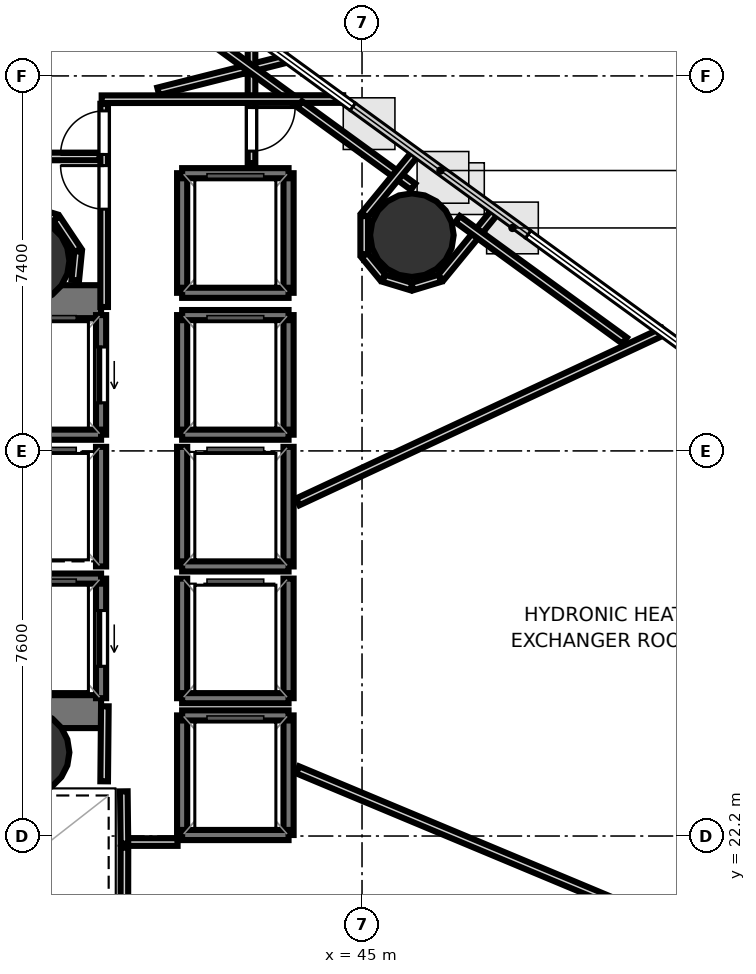
"""IFC4 building model, lengths in metres.
Left out: names, types, materials, properties, quantities, classifications, styles, units other than length and angle.
Written with IfcOpenShell. Run it as: python <this file> out.ifc"""

import sys

from ifc_helpers import new_model, si_unit, direction, frame, frame_2d, origin, origin_2d, place, context, subcontext, project, spatial, rectangle, hollow_circle, extrude, element, fill, save


model = new_model("IFC4")
c1 = context("Model", 3, precision=1e-05, world=origin(), true_north=direction((0.0, 1.0)))
c2 = subcontext(c1, "Body", "Model", "MODEL_VIEW")
j1 = project(units=[si_unit("LENGTHUNIT", "METRE"), si_unit("PLANEANGLEUNIT", "RADIAN")], contexts=[c1])
p1 = place(None, origin())
s1 = spatial("IfcSite", under=j1, at=p1, CompositionType="ELEMENT")
p2 = place(p1, origin())
s2 = spatial("IfcBuilding", under=s1, at=p2, CompositionType="ELEMENT")
p3 = place(p2, frame((0.0, 0.0, 93.2)))
s3 = spatial("IfcBuildingStorey", under=s2, at=p3, CompositionType="ELEMENT", Elevation=93.2)
p4 = place(p3, frame((29.13, 32.745, 0.0), z_axis=(0.0, 0.0, 1.0), x_axis=(1.0, 0.0, 0.0)))
e1 = element("IfcWall", 1, at=p4, inside=s3, PredefinedType="SHEAR", context=c2, shape_type="SweptSolid", body=[
    extrude(rectangle(XDim=10.72, YDim=0.65, at=frame_2d((5.36, 0.0))), origin(), (0.0, 0.0, 1.0), 4.42),
])
p5 = place(p4, frame((1.095, 0.0, 0.0)))
e2 = element("IfcOpeningElement", 2, at=p5, cuts=e1, PredefinedType="OPENING", context=c2, shape_type="SweptSolid", body=[
    extrude(rectangle(XDim=1.25, YDim=2.15, at=frame_2d((0.625, 1.075))), frame((0.0, 0.335, 0.0), z_axis=(0.0, -1.0, 0.0), x_axis=(1.0, 0.0, 0.0)), (0.0, 0.0, 1.0), 0.67),
])
p6 = place(p3, frame((29.13, 24.655, 0.0), z_axis=(0.0, 0.0, 1.0), x_axis=(1.0, 0.0, 0.0)))
e3 = element("IfcWall", 3, at=p6, inside=s3, PredefinedType="SHEAR", context=c2, shape_type="SweptSolid", body=[
    extrude(rectangle(XDim=10.72, YDim=0.65, at=frame_2d((5.36, 0.0))), origin(), (0.0, 0.0, 1.0), 4.42),
])
p7 = place(p6, frame((0.895, 0.0, 0.0)))
e4 = element("IfcOpeningElement", 4, at=p7, cuts=e3, PredefinedType="OPENING", context=c2, shape_type="SweptSolid", body=[
    extrude(rectangle(XDim=1.25, YDim=2.15, at=frame_2d((0.625, 1.075))), frame((0.0, 0.335, 0.0), z_axis=(0.0, -1.0, 0.0), x_axis=(1.0, 0.0, 0.0)), (0.0, 0.0, 1.0), 0.67),
])
for number, where, z_axis, x_axis in (
    (5, (38.4, 33.55, 0.0), (0.0, 0.0, 1.0), (1.0, 0.0, 0.0)),
    (6, (38.4, 23.85, 0.0), (0.0, 0.0, 1.0), (1.0, 0.0, 0.0)),
    (7, (45.984, 34.057, 0.0), (0.0, 0.0, 1.0), (1.0, 0.0, 0.0)),
):
    element("IfcColumn", number, at=place(p3, frame(where, z_axis=z_axis, x_axis=x_axis)), inside=s3, PredefinedType="COLUMN", context=c2, shape_type="SweptSolid", body=[
        extrude(hollow_circle(Radius=0.825, WallThickness=0.04, at=origin_2d()), origin(), (0.0, 0.0, 1.0), 4.6),
    ])
p8 = place(p3, frame((39.85, 30.12, 0.0), z_axis=(0.0, 0.0, 1.0), x_axis=(0.0, 1.0, 0.0)))
e8 = element("IfcWall", 8, at=p8, inside=s3, PredefinedType="SOLIDWALL", context=c2, shape_type="SweptSolid", body=[
    extrude(rectangle(XDim=2.36, YDim=0.2, at=frame_2d((1.18, 0.0))), origin(), (0.0, 0.0, 1.0), 4.42),
])
p9 = place(p8, frame((0.63, 0.0, 0.0)))
e9 = element("IfcOpeningElement", 9, at=p9, cuts=e8, PredefinedType="OPENING", context=c2, shape_type="SweptSolid", body=[
    extrude(rectangle(XDim=1.1, YDim=2.15, at=frame_2d((0.55, 1.075))), frame((0.0, 0.11, 0.0), z_axis=(0.0, -1.0, 0.0), x_axis=(1.0, 0.0, 0.0)), (0.0, 0.0, 1.0), 0.22),
])
p10 = place(p3, frame((37.75, 30.12, 0.0), z_axis=(0.0, 0.0, 1.0), x_axis=(1.0, 0.0, 0.0)))
e10 = element("IfcWall", 10, at=p10, inside=s3, PredefinedType="SOLIDWALL", context=c2, shape_type="SweptSolid", body=[
    extrude(rectangle(XDim=2.1, YDim=0.2, at=frame_2d((1.05, 0.0))), origin(), (0.0, 0.0, 1.0), 4.42),
])
p11 = place(p3, frame((39.85, 24.92, 0.0), z_axis=(0.0, 0.0, 1.0), x_axis=(0.0, 1.0, 0.0)))
e11 = element("IfcWall", 11, at=p11, inside=s3, PredefinedType="SOLIDWALL", context=c2, shape_type="SweptSolid", body=[
    extrude(rectangle(XDim=2.36, YDim=0.2, at=frame_2d((1.18, 0.0))), origin(), (0.0, 0.0, 1.0), 4.42),
])
p12 = place(p11, frame((0.63, 0.0, 0.0)))
e12 = element("IfcOpeningElement", 12, at=p12, cuts=e11, PredefinedType="OPENING", context=c2, shape_type="SweptSolid", body=[
    extrude(rectangle(XDim=1.1, YDim=2.15, at=frame_2d((0.55, 1.075))), frame((0.0, 0.11, 0.0), z_axis=(0.0, -1.0, 0.0), x_axis=(1.0, 0.0, 0.0)), (0.0, 0.0, 1.0), 0.22),
])
p13 = place(p3, frame((37.75, 27.28, 0.0), z_axis=(0.0, 0.0, 1.0), x_axis=(1.0, 0.0, 0.0)))
e13 = element("IfcWall", 13, at=p13, inside=s3, PredefinedType="SOLIDWALL", context=c2, shape_type="SweptSolid", body=[
    extrude(rectangle(XDim=2.1, YDim=0.2, at=frame_2d((1.05, 0.0))), origin(), (0.0, 0.0, 1.0), 4.42),
])
for number, where, z_axis, x_axis in (
    (14, (43.55, 30.12, 0.0), (0.0, 0.0, 1.0), (0.0, 1.0, 0.0)),
    (15, (41.45, 30.12, 0.0), (0.0, 0.0, 1.0), (0.0, 1.0, 0.0)),
):
    element("IfcWall", number, at=place(p3, frame(where, z_axis=z_axis, x_axis=x_axis)), inside=s3, PredefinedType="SOLIDWALL", context=c2, shape_type="SweptSolid", body=[
        extrude(rectangle(XDim=2.36, YDim=0.2, at=frame_2d((1.18, 0.0))), origin(), (0.0, 0.0, 1.0), 4.42),
    ])
for number, where, z_axis, x_axis in (
    (16, (41.45, 32.48, 0.0), (0.0, 0.0, 1.0), (1.0, 0.0, 0.0)),
    (17, (41.45, 30.12, 0.0), (0.0, 0.0, 1.0), (1.0, 0.0, 0.0)),
):
    element("IfcWall", number, at=place(p3, frame(where, z_axis=z_axis, x_axis=x_axis)), inside=s3, PredefinedType="SOLIDWALL", context=c2, shape_type="SweptSolid", body=[
        extrude(rectangle(XDim=2.1, YDim=0.2, at=frame_2d((1.05, 0.0))), origin(), (0.0, 0.0, 1.0), 4.42),
    ])
for number, where, z_axis, x_axis in (
    (18, (43.55, 27.52, 0.0), (0.0, 0.0, 1.0), (0.0, 1.0, 0.0)),
    (19, (41.45, 27.52, 0.0), (0.0, 0.0, 1.0), (0.0, 1.0, 0.0)),
):
    element("IfcWall", number, at=place(p3, frame(where, z_axis=z_axis, x_axis=x_axis)), inside=s3, PredefinedType="SOLIDWALL", context=c2, shape_type="SweptSolid", body=[
        extrude(rectangle(XDim=2.36, YDim=0.2, at=frame_2d((1.18, 0.0))), origin(), (0.0, 0.0, 1.0), 4.42),
    ])
p14 = place(p3, frame((41.45, 27.52, 0.0), z_axis=(0.0, 0.0, 1.0), x_axis=(1.0, 0.0, 0.0)))
e20 = element("IfcWall", 20, at=p14, inside=s3, PredefinedType="SOLIDWALL", context=c2, shape_type="SweptSolid", body=[
    extrude(rectangle(XDim=2.1, YDim=0.2, at=frame_2d((1.05, 0.0))), origin(), (0.0, 0.0, 1.0), 4.42),
])
for number, where, z_axis, x_axis in (
    (21, (43.55, 24.92, 0.0), (0.0, 0.0, 1.0), (0.0, 1.0, 0.0)),
    (22, (41.45, 24.92, 0.0), (0.0, 0.0, 1.0), (0.0, 1.0, 0.0)),
):
    element("IfcWall", number, at=place(p3, frame(where, z_axis=z_axis, x_axis=x_axis)), inside=s3, PredefinedType="SOLIDWALL", context=c2, shape_type="SweptSolid", body=[
        extrude(rectangle(XDim=2.36, YDim=0.2, at=frame_2d((1.18, 0.0))), origin(), (0.0, 0.0, 1.0), 4.42),
    ])
p15 = place(p3, frame((41.45, 24.92, 0.0), z_axis=(0.0, 0.0, 1.0), x_axis=(1.0, 0.0, 0.0)))
e23 = element("IfcWall", 23, at=p15, inside=s3, PredefinedType="SOLIDWALL", context=c2, shape_type="SweptSolid", body=[
    extrude(rectangle(XDim=2.1, YDim=0.2, at=frame_2d((1.05, 0.0))), origin(), (0.0, 0.0, 1.0), 4.42),
])
p16 = place(p3, frame((39.85, 27.52, 0.0), z_axis=(0.0, 0.0, 1.0), x_axis=(0.0, 1.0, 0.0)))
e24 = element("IfcWall", 24, at=p16, inside=s3, PredefinedType="SOLIDWALL", context=c2, shape_type="SweptSolid", body=[
    extrude(rectangle(XDim=2.36, YDim=0.2, at=frame_2d((1.18, 0.0))), origin(), (0.0, 0.0, 1.0), 4.42),
])
for number, where, z_axis, x_axis in (
    (25, (43.55, 22.22, 0.0), (0.0, 0.0, 1.0), (0.0, 1.0, 0.0)),
    (26, (41.45, 22.22, 0.0), (0.0, 0.0, 1.0), (0.0, 1.0, 0.0)),
):
    element("IfcWall", number, at=place(p3, frame(where, z_axis=z_axis, x_axis=x_axis)), inside=s3, PredefinedType="SOLIDWALL", context=c2, shape_type="SweptSolid", body=[
        extrude(rectangle(XDim=2.36, YDim=0.2, at=frame_2d((1.18, 0.0))), origin(), (0.0, 0.0, 1.0), 4.42),
    ])
for number, where, z_axis, x_axis in (
    (27, (41.45, 24.58, 0.0), (0.0, 0.0, 1.0), (1.0, 0.0, 0.0)),
    (28, (41.45, 22.22, 0.0), (0.0, 0.0, 1.0), (1.0, 0.0, 0.0)),
):
    element("IfcWall", number, at=place(p3, frame(where, z_axis=z_axis, x_axis=x_axis)), inside=s3, PredefinedType="SOLIDWALL", context=c2, shape_type="SweptSolid", body=[
        extrude(rectangle(XDim=2.1, YDim=0.2, at=frame_2d((1.05, 0.0))), origin(), (0.0, 0.0, 1.0), 4.42),
    ])
for number, where, z_axis, x_axis in (
    (29, (43.55, 32.92, 0.0), (0.0, 0.0, 1.0), (0.0, 1.0, 0.0)),
    (30, (41.45, 32.92, 0.0), (0.0, 0.0, 1.0), (0.0, 1.0, 0.0)),
):
    element("IfcWall", number, at=place(p3, frame(where, z_axis=z_axis, x_axis=x_axis)), inside=s3, PredefinedType="SOLIDWALL", context=c2, shape_type="SweptSolid", body=[
        extrude(rectangle(XDim=2.36, YDim=0.2, at=frame_2d((1.18, 0.0))), origin(), (0.0, 0.0, 1.0), 4.42),
    ])
for number, where, z_axis, x_axis in (
    (31, (41.45, 35.28, 0.0), (0.0, 0.0, 1.0), (1.0, 0.0, 0.0)),
    (32, (41.45, 32.92, 0.0), (0.0, 0.0, 1.0), (1.0, 0.0, 0.0)),
):
    element("IfcWall", number, at=place(p3, frame(where, z_axis=z_axis, x_axis=x_axis)), inside=s3, PredefinedType="SOLIDWALL", context=c2, shape_type="SweptSolid", body=[
        extrude(rectangle(XDim=2.1, YDim=0.2, at=frame_2d((1.05, 0.0))), origin(), (0.0, 0.0, 1.0), 4.42),
    ])
p17 = place(p3, frame((39.911, 32.64, 0.0), z_axis=(0.0, 0.0, 1.0), x_axis=(0.0, 1.0, 0.0)))
e33 = element("IfcWall", 33, at=p17, inside=s3, PredefinedType="PARTITIONING", context=c2, shape_type="SweptSolid", body=[
    extrude(rectangle(XDim=4.01, YDim=0.15, at=frame_2d((2.005, 0.0))), origin(), (0.0, 0.0, 1.0), 2.94),
])
p18 = place(p17, frame((3.01, 0.0, 0.0)))
e34 = element("IfcOpeningElement", 34, at=p18, cuts=e33, PredefinedType="OPENING", context=c2, shape_type="SweptSolid", body=[
    extrude(rectangle(XDim=0.86, YDim=2.05, at=frame_2d((0.43, 1.025))), frame((0.0, 0.085, 0.0), z_axis=(0.0, -1.0, 0.0), x_axis=(1.0, 0.0, 0.0)), (0.0, 0.0, 1.0), 0.17),
])
p19 = place(p17, frame((1.93, 0.0, 0.0)))
e35 = element("IfcOpeningElement", 35, at=p19, cuts=e33, PredefinedType="OPENING", context=c2, shape_type="SweptSolid", body=[
    extrude(rectangle(XDim=0.86, YDim=2.05, at=frame_2d((0.43, 1.025))), frame((0.0, 0.085, 0.0), z_axis=(0.0, -1.0, 0.0), x_axis=(1.0, 0.0, 0.0)), (0.0, 0.0, 1.0), 0.17),
])
p20 = place(p3, frame((40.978, 36.896, 0.0), z_axis=(0.0, 0.0, 1.0), x_axis=(0.969602772959, 0.244684414441, 0.0)))
e36 = element("IfcWall", 36, at=p20, inside=s3, PredefinedType="PARTITIONING", context=c2, shape_type="SweptSolid", body=[
    extrude(rectangle(XDim=2.619, YDim=0.15, at=frame_2d((1.31, 0.0))), origin(), (0.0, 0.0, 1.0), 2.94),
])
p21 = place(p3, frame((42.819, 38.065, 0.0), z_axis=(0.0, 0.0, 1.0), x_axis=(0.0, -1.0, 0.0)))
e37 = element("IfcWall", 37, at=p21, inside=s3, PredefinedType="PARTITIONING", context=c2, shape_type="SweptSolid", body=[
    extrude(rectangle(XDim=2.585, YDim=0.15, at=frame_2d((1.292, 0.0))), origin(), (0.0, 0.0, 1.0), 2.94),
])
p22 = place(p21, frame((1.489, 0.0, 0.0)))
e38 = element("IfcOpeningElement", 38, at=p22, cuts=e37, PredefinedType="OPENING", context=c2, shape_type="SweptSolid", body=[
    extrude(rectangle(XDim=0.86, YDim=2.05, at=frame_2d((0.43, 1.025))), frame((0.0, 0.085, 0.0), z_axis=(0.0, -1.0, 0.0), x_axis=(1.0, 0.0, 0.0)), (0.0, 0.0, 1.0), 0.17),
])
p23 = place(p3, frame((41.36, 22.081, 0.0), z_axis=(0.0, 0.0, 1.0), x_axis=(-1.0, 0.0, 0.0)))
e39 = element("IfcWall", 39, at=p23, inside=s3, PredefinedType="PARTITIONING", context=c2, shape_type="SweptSolid", body=[
    extrude(rectangle(XDim=1.08, YDim=0.15, at=frame_2d((0.54, 0.0))), origin(), (0.0, 0.0, 1.0), 2.94),
])
p24 = place(p3, frame((40.311, 22.05, 0.0), z_axis=(0.0, 0.0, 1.0), x_axis=(-0.011836292006, 0.999929948642, 0.0)))
e40 = element("IfcWall", 40, at=p24, inside=s3, PredefinedType="PARTITIONING", context=c2, shape_type="SweptSolid", body=[
    extrude(rectangle(XDim=1.031, YDim=0.15, at=frame_2d((0.516, 0.0))), origin(), (0.0, 0.0, 1.0), 2.94),
])
p25 = place(p3, frame((39.911, 23.28, 0.0), z_axis=(0.0, 0.0, 1.0), x_axis=(0.009397771291, 0.999955839972, 0.0)))
e41 = element("IfcWall", 41, at=p25, inside=s3, PredefinedType="PARTITIONING", context=c2, shape_type="SweptSolid", body=[
    extrude(rectangle(XDim=1.481, YDim=0.15, at=frame_2d((0.74, 0.0))), origin(), (0.0, 0.0, 1.0), 2.94),
])
p26 = place(p3, frame((40.149, 39.275, 0.0), z_axis=(0.0, 0.0, 1.0), x_axis=(0.808678485234, -0.588250888243, 0.0)))
e42 = element("IfcWall", 42, at=p26, inside=s3, PredefinedType="PARTITIONING", context=c2, shape_type="SweptSolid", body=[
    extrude(rectangle(XDim=4.399, YDim=0.15, at=frame_2d((2.2, 0.0))), origin(), (0.0, 0.0, 1.0), 2.94),
])
p27 = place(p3, frame((44.628, 36.744, 0.0), z_axis=(0.0, 0.0, 1.0), x_axis=(-0.999999742855, -0.000717139453, 0.0)))
e43 = element("IfcWall", 43, at=p27, inside=s3, PredefinedType="PARTITIONING", context=c2, shape_type="SweptSolid", body=[
    extrude(rectangle(XDim=4.766, YDim=0.15, at=frame_2d((2.383, 0.0))), origin(), (0.0, 0.0, 1.0), 2.94),
])
p28 = place(p3, frame((39.818, 35.611, 0.0), z_axis=(0.0, 0.0, 1.0), x_axis=(-1.0, 0.0, 0.0)))
e44 = element("IfcWall", 44, at=p28, inside=s3, PredefinedType="PARTITIONING", context=c2, shape_type="SweptSolid", body=[
    extrude(rectangle(XDim=7.398, YDim=0.15, at=frame_2d((3.699, 0.0))), origin(), (0.0, 0.0, 1.0), 2.94),
])
p29 = place(p3, frame((43.733, 28.795, 0.0), z_axis=(0.0, 0.0, 1.0), x_axis=(0.906319515089, 0.422593109941, 0.0)))
e45 = element("IfcWall", 45, at=p29, inside=s3, PredefinedType="PARTITIONING", context=c2, shape_type="SweptSolid", body=[
    extrude(rectangle(XDim=7.955, YDim=0.15, at=frame_2d((3.978, 0.0))), origin(), (0.0, 0.0, 1.0), 2.94),
])
p30 = place(p3, frame((56.702, 18.086, 0.0), z_axis=(0.0, 0.0, 1.0), x_axis=(-0.922688059658, 0.385547331161, 0.0)))
e46 = element("IfcWall", 46, at=p30, inside=s3, PredefinedType="PARTITIONING", context=c2, shape_type="SweptSolid", body=[
    extrude(rectangle(XDim=14.06, YDim=0.15, at=frame_2d((7.03, 0.0))), origin(), (0.0, 0.0, 1.0), 2.94),
])
p31 = place(p30, frame((6.505, 0.0, 0.0)))
e47 = element("IfcOpeningElement", 47, at=p31, cuts=e46, PredefinedType="OPENING", context=c2, shape_type="SweptSolid", body=[
    extrude(rectangle(XDim=1.05, YDim=2.15, at=frame_2d((0.525, 1.075))), frame((0.0, 0.085, 0.0), z_axis=(0.0, -1.0, 0.0), x_axis=(1.0, 0.0, 0.0)), (0.0, 0.0, 1.0), 0.17),
])
p32 = place(p3, frame((40.306, 17.945, 0.0), z_axis=(0.0, 0.0, 1.0), x_axis=(0.001334545369, 0.999999109494, 0.0)))
e48 = element("IfcWall", 48, at=p32, inside=s3, PredefinedType="PARTITIONING", context=c2, shape_type="SweptSolid", body=[
    extrude(rectangle(XDim=4.025, YDim=0.15, at=frame_2d((2.012, 0.0))), origin(), (0.0, 0.0, 1.0), 2.94),
])
p33 = place(p3, frame((43.771, 36.64, 0.0), z_axis=(0.0, 0.0, 1.0), x_axis=(0.80866355955, -0.588271406287, 0.0)))
e49 = element("IfcWall", 49, at=p33, inside=s3, PredefinedType="PARTITIONING", context=c2, shape_type="SweptSolid", body=[
    extrude(rectangle(XDim=2.766, YDim=0.15, at=frame_2d((1.383, 0.0))), origin(), (0.0, 0.0, 1.0), 2.94),
])
p34 = place(p3, frame((46.074, 35.702, 0.0), z_axis=(0.0, 0.0, 1.0), x_axis=(-0.634291123896, -0.773094282832, 0.0)))
e50 = element("IfcWall", 50, at=p34, inside=s3, PredefinedType="PARTITIONING", context=c2, shape_type="SweptSolid", body=[
    extrude(rectangle(XDim=1.615, YDim=0.15, at=frame_2d((0.807, 0.0))), origin(), (0.0, 0.0, 1.0), 2.94),
])
p35 = place(p3, frame((45.043, 34.434, 0.0), z_axis=(0.0, 0.0, 1.0), x_axis=(0.0, -1.0, 0.0)))
e51 = element("IfcWall", 51, at=p35, inside=s3, PredefinedType="PARTITIONING", context=c2, shape_type="SweptSolid", body=[
    extrude(rectangle(XDim=0.754, YDim=0.15, at=frame_2d((0.377, 0.0))), origin(), (0.0, 0.0, 1.0), 2.94),
])
for number, where, z_axis, x_axis in (
    (52, (45.05, 33.66, 0.0), (0.0, 0.0, 1.0), (0.634, -0.773, 0.0)),
    (53, (45.428, 33.208, 0.0), (0.0, 0.0, 1.0), (0.957, -0.29, 0.0)),
    (54, (45.993, 33.042, 0.0), (0.0, 0.0, 1.0), (0.957, 0.29, 0.0)),
):
    element("IfcWall", number, at=place(p3, frame(where, z_axis=z_axis, x_axis=x_axis)), inside=s3, PredefinedType="PARTITIONING", context=c2, shape_type="SweptSolid", body=[
        extrude(rectangle(XDim=0.572, YDim=0.15, at=frame_2d((0.286, 0.0))), origin(), (0.0, 0.0, 1.0), 2.94),
    ])
p36 = place(p3, frame((46.555, 33.218, 0.0), z_axis=(0.0, 0.0, 1.0), x_axis=(0.634344749857, 0.773050281889, 0.0)))
e55 = element("IfcWall", 55, at=p36, inside=s3, PredefinedType="PARTITIONING", context=c2, shape_type="SweptSolid", body=[
    extrude(rectangle(XDim=1.729, YDim=0.15, at=frame_2d((0.864, 0.0))), origin(), (0.0, 0.0, 1.0), 2.94),
])
p37 = place(p3, frame((46.886, 34.374, 0.0), z_axis=(0.0, 0.0, 1.0), x_axis=(0.808707605228, -0.58821085441, 0.0)))
e56 = element("IfcWall", 56, at=p37, inside=s3, PredefinedType="PARTITIONING", context=c2, shape_type="SweptSolid", body=[
    extrude(rectangle(XDim=4.078, YDim=0.15, at=frame_2d((2.039, 0.0))), origin(), (0.0, 0.0, 1.0), 2.94),
])
p38 = place(p3, frame((39.341, 33.17, 0.0), z_axis=(0.0, 0.0, 1.0), x_axis=(0.098193262045, 0.995167364461, 0.0)))
e57 = element("IfcWall", 57, at=p38, inside=s3, PredefinedType="PARTITIONING", context=c2, shape_type="SweptSolid", body=[
    extrude(rectangle(XDim=0.572, YDim=0.15, at=frame_2d((0.286, 0.0))), origin(), (0.0, 0.0, 1.0), 2.94),
])
p39 = place(p3, frame((39.392, 33.76, 0.0), z_axis=(0.0, 0.0, 1.0), x_axis=(-0.555746078923, 0.831352088926, 0.0)))
e58 = element("IfcWall", 58, at=p39, inside=s3, PredefinedType="PARTITIONING", context=c2, shape_type="SweptSolid", body=[
    extrude(rectangle(XDim=0.754, YDim=0.15, at=frame_2d((0.377, 0.0))), origin(), (0.0, 0.0, 1.0), 2.94),
])
p40 = place(p3, frame((38.956, 34.399, 0.0), z_axis=(0.0, 0.0, 1.0), x_axis=(-0.956952578659, 0.290244314669, 0.0)))
e59 = element("IfcWall", 59, at=p40, inside=s3, PredefinedType="PARTITIONING", context=c2, shape_type="SweptSolid", body=[
    extrude(rectangle(XDim=0.572, YDim=0.15, at=frame_2d((0.286, 0.0))), origin(), (0.0, 0.0, 1.0), 2.94),
])
p41 = place(p9, origin())
e60 = element("IfcDoor", 60, at=p41, inside=s3, OperationType="SLIDING_TO_LEFT", PredefinedType="DOOR", context=c2, shape_type="SweptSolid", body=[
    extrude(rectangle(XDim=1.1, YDim=2.15, at=frame_2d((0.55, 1.075))), frame((0.0, 0.025, 0.0), z_axis=(0.0, -1.0, 0.0), x_axis=(1.0, 0.0, 0.0)), (0.0, 0.0, 1.0), 0.05),
])
fill(e9, e60)
p42 = place(p12, origin())
e61 = element("IfcDoor", 61, at=p42, inside=s3, OperationType="SLIDING_TO_LEFT", PredefinedType="DOOR", context=c2, shape_type="SweptSolid", body=[
    extrude(rectangle(XDim=1.1, YDim=2.15, at=frame_2d((0.55, 1.075))), frame((0.0, 0.025, 0.0), z_axis=(0.0, -1.0, 0.0), x_axis=(1.0, 0.0, 0.0)), (0.0, 0.0, 1.0), 0.05),
])
fill(e12, e61)
p43 = place(p18, origin())
e62 = element("IfcDoor", 62, at=p43, inside=s3, OperationType="SINGLE_SWING_LEFT", PredefinedType="DOOR", context=c2, shape_type="SweptSolid", body=[
    extrude(rectangle(XDim=0.86, YDim=2.05, at=frame_2d((0.43, 1.025))), frame((0.0, 0.025, 0.0), z_axis=(0.0, -1.0, 0.0), x_axis=(1.0, 0.0, 0.0)), (0.0, 0.0, 1.0), 0.05),
])
fill(e34, e62)
p44 = place(p22, origin())
e63 = element("IfcDoor", 63, at=p44, inside=s3, OperationType="SINGLE_SWING_LEFT", PredefinedType="DOOR", context=c2, shape_type="SweptSolid", body=[
    extrude(rectangle(XDim=0.86, YDim=2.05, at=frame_2d((0.43, 1.025))), frame((0.0, 0.025, 0.0), z_axis=(0.0, -1.0, 0.0), x_axis=(1.0, 0.0, 0.0)), (0.0, 0.0, 1.0), 0.05),
])
fill(e38, e63)
p45 = place(p19, origin())
e64 = element("IfcDoor", 64, at=p45, inside=s3, OperationType="SINGLE_SWING_RIGHT", PredefinedType="DOOR", context=c2, shape_type="SweptSolid", body=[
    extrude(rectangle(XDim=0.86, YDim=2.05, at=frame_2d((0.43, 1.025))), frame((0.0, 0.025, 0.0), z_axis=(0.0, -1.0, 0.0), x_axis=(1.0, 0.0, 0.0)), (0.0, 0.0, 1.0), 0.05),
])
fill(e35, e64)
save(model, sys.argv[1])
